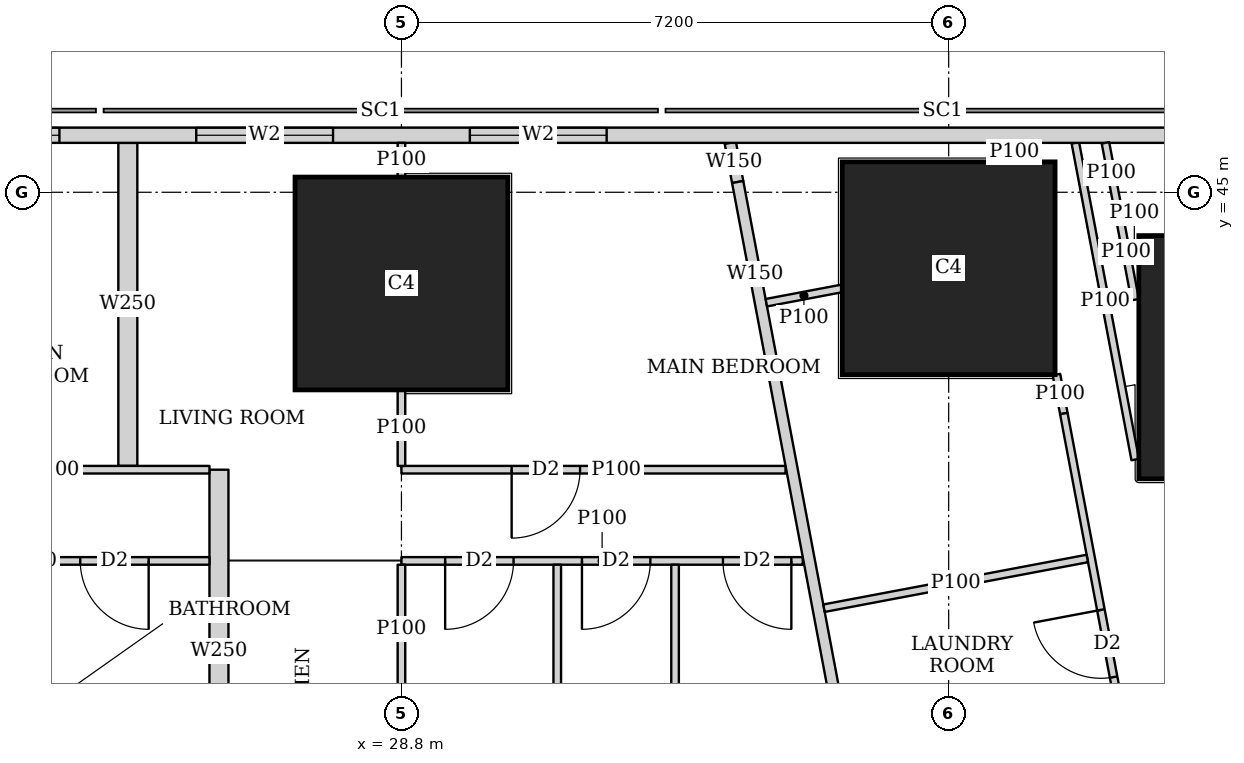
"""IFC4 building model, lengths in metres.
Left out: names, types, materials, properties, quantities, classifications, styles, units other than length and angle.
Written with IfcOpenShell. Run it as: python <this file> out.ifc"""

import sys

from ifc_helpers import new_model, si_unit, direction, frame, frame_2d, origin, origin_2d, place, context, subcontext, project, spatial, rectangle, extrude, element, fill, save


model = new_model("IFC4")
c1 = context("Model", 3, precision=1e-05, world=origin(), true_north=direction((0.0, 1.0)))
c2 = subcontext(c1, "Body", "Model", "MODEL_VIEW")
j1 = project(units=[si_unit("LENGTHUNIT", "METRE"), si_unit("PLANEANGLEUNIT", "RADIAN")], contexts=[c1])
p1 = place(None, origin())
s1 = spatial("IfcSite", under=j1, at=p1, CompositionType="ELEMENT")
p2 = place(p1, origin())
s2 = spatial("IfcBuilding", under=s1, at=p2, CompositionType="ELEMENT")
p3 = place(p2, frame((0.0, 0.0, 65.0)))
s3 = spatial("IfcBuildingStorey", under=s2, at=p3, CompositionType="ELEMENT", Elevation=65.0)
p4 = place(p3, frame((40.102, 42.83, 0.0), z_axis=(0.0, 0.0, 1.0), x_axis=(1.0, 0.0, 0.0)))
e1 = element("IfcColumn", 1, at=p4, inside=s3, PredefinedType="COLUMN", context=c2, shape_type="SweptSolid", body=[
    extrude(rectangle(XDim=3.2, YDim=3.2, at=origin_2d()), origin(), (0.0, 0.0, 1.0), 3.75),
])
for number, where, z_axis, x_axis in (
    (2, (28.8, 43.8, 0.0), (0.0, 0.0, 1.0), (1.0, 0.0, 0.0)),
    (3, (36.0, 44.0, 0.0), (0.0, 0.0, 1.0), (1.0, 0.0, 0.0)),
):
    element("IfcColumn", number, at=place(p3, frame(where, z_axis=z_axis, x_axis=x_axis)), inside=s3, PredefinedType="COLUMN", context=c2, shape_type="SweptSolid", body=[
        extrude(rectangle(XDim=2.8, YDim=2.8, at=origin_2d()), origin(), (0.0, 0.0, 1.0), 3.75),
    ])
p5 = place(p3, frame((40.106, 45.75, 0.0), z_axis=(0.0, 0.0, 1.0), x_axis=(-1.0, 0.0, 0.0)))
e4 = element("IfcWall", 4, at=p5, inside=s3, PredefinedType="SOLIDWALL", context=c2, shape_type="SweptSolid", body=[
    extrude(rectangle(XDim=37.943, YDim=0.2, at=frame_2d((18.971, 0.0))), origin(), (0.0, 0.0, 1.0), 3.5),
])
p6 = place(p5, frame((8.606, 0.0, 0.9)))
e5 = element("IfcOpeningElement", 5, at=p6, cuts=e4, PredefinedType="OPENING", context=c2, shape_type="SweptSolid", body=[
    extrude(rectangle(XDim=1.8, YDim=1.5, at=frame_2d((0.9, 0.75))), frame((0.0, 0.11, 0.0), z_axis=(0.0, -1.0, 0.0), x_axis=(1.0, 0.0, 0.0)), (0.0, 0.0, 1.0), 0.22),
])
p7 = place(p5, frame((12.206, 0.0, 0.9)))
e6 = element("IfcOpeningElement", 6, at=p7, cuts=e4, PredefinedType="OPENING", context=c2, shape_type="SweptSolid", body=[
    extrude(rectangle(XDim=1.8, YDim=1.5, at=frame_2d((0.9, 0.75))), frame((0.0, 0.11, 0.0), z_axis=(0.0, -1.0, 0.0), x_axis=(1.0, 0.0, 0.0)), (0.0, 0.0, 1.0), 0.22),
])
p8 = place(p5, frame((15.806, 0.0, 0.9)))
e7 = element("IfcOpeningElement", 7, at=p8, cuts=e4, PredefinedType="OPENING", context=c2, shape_type="SweptSolid", body=[
    extrude(rectangle(XDim=1.8, YDim=1.5, at=frame_2d((0.9, 0.75))), frame((0.0, 0.11, 0.0), z_axis=(0.0, -1.0, 0.0), x_axis=(1.0, 0.0, 0.0)), (0.0, 0.0, 1.0), 0.22),
])
p9 = place(p5, frame((19.406, 0.0, 0.9)))
e8 = element("IfcOpeningElement", 8, at=p9, cuts=e4, PredefinedType="OPENING", context=c2, shape_type="SweptSolid", body=[
    extrude(rectangle(XDim=1.8, YDim=1.5, at=frame_2d((0.9, 0.75))), frame((0.0, 0.11, 0.0), z_axis=(0.0, -1.0, 0.0), x_axis=(1.0, 0.0, 0.0)), (0.0, 0.0, 1.0), 0.22),
])
p10 = place(p5, frame((23.006, 0.0, 0.9)))
e9 = element("IfcOpeningElement", 9, at=p10, cuts=e4, PredefinedType="OPENING", context=c2, shape_type="SweptSolid", body=[
    extrude(rectangle(XDim=1.8, YDim=1.5, at=frame_2d((0.9, 0.75))), frame((0.0, 0.11, 0.0), z_axis=(0.0, -1.0, 0.0), x_axis=(1.0, 0.0, 0.0)), (0.0, 0.0, 1.0), 0.22),
])
p11 = place(p5, frame((26.606, 0.0, 0.9)))
e10 = element("IfcOpeningElement", 10, at=p11, cuts=e4, PredefinedType="OPENING", context=c2, shape_type="SweptSolid", body=[
    extrude(rectangle(XDim=1.8, YDim=1.5, at=frame_2d((0.9, 0.75))), frame((0.0, 0.11, 0.0), z_axis=(0.0, -1.0, 0.0), x_axis=(1.0, 0.0, 0.0)), (0.0, 0.0, 1.0), 0.22),
])
p12 = place(p3, frame((33.127, 45.65, 0.0), z_axis=(0.0, 0.0, 1.0), x_axis=(0.185441815104, -0.982655246366, 0.0)))
e11 = element("IfcWall", 11, at=p12, inside=s3, PredefinedType="SOLIDWALL", context=c2, shape_type="SweptSolid", body=[
    extrude(rectangle(XDim=0.524, YDim=0.15, at=frame_2d((0.262, 0.0))), origin(), (0.0, 0.0, 1.0), 3.5),
])
p13 = place(p3, frame((33.224, 45.135, 0.0), z_axis=(0.0, 0.0, 1.0), x_axis=(0.185681462868, -0.982609990967, 0.0)))
e12 = element("IfcWall", 12, at=p13, inside=s3, PredefinedType="SOLIDWALL", context=c2, shape_type="SweptSolid", body=[
    extrude(rectangle(XDim=2.455, YDim=0.15, at=frame_2d((1.228, 0.0))), origin(), (0.0, 0.0, 1.0), 2.05),
])
p14 = place(p3, frame((33.68, 42.723, 0.0), z_axis=(0.0, 0.0, 1.0), x_axis=(0.185624129307, -0.98262082342, 0.0)))
e13 = element("IfcWall", 13, at=p14, inside=s3, PredefinedType="SOLIDWALL", context=c2, shape_type="SweptSolid", body=[
    extrude(rectangle(XDim=41.051, YDim=0.15, at=frame_2d((20.526, 0.0))), origin(), (0.0, 0.0, 1.0), 2.5),
])
p15 = place(p14, frame((13.577, 0.0, 0.0)))
e14 = element("IfcOpeningElement", 14, at=p15, cuts=e13, PredefinedType="OPENING", context=c2, shape_type="SweptSolid", body=[
    extrude(rectangle(XDim=1.0, YDim=2.1, at=frame_2d((0.5, 1.05))), frame((0.0, 0.085, 0.0), z_axis=(0.0, -1.0, 0.0), x_axis=(1.0, 0.0, 0.0)), (0.0, 0.0, 1.0), 0.17),
])
p16 = place(p14, frame((17.394, 0.0, 0.0)))
e15 = element("IfcOpeningElement", 15, at=p16, cuts=e13, PredefinedType="OPENING", context=c2, shape_type="SweptSolid", body=[
    extrude(rectangle(XDim=1.0, YDim=2.1, at=frame_2d((0.5, 1.05))), frame((0.0, 0.085, 0.0), z_axis=(0.0, -1.0, 0.0), x_axis=(1.0, 0.0, 0.0)), (0.0, 0.0, 1.0), 0.17),
])
p17 = place(p14, frame((26.758, 0.0, 0.0)))
e16 = element("IfcOpeningElement", 16, at=p17, cuts=e13, PredefinedType="OPENING", context=c2, shape_type="SweptSolid", body=[
    extrude(rectangle(XDim=1.0, YDim=2.1, at=frame_2d((0.5, 1.05))), frame((0.0, 0.085, 0.0), z_axis=(0.0, -1.0, 0.0), x_axis=(1.0, 0.0, 0.0)), (0.0, 0.0, 1.0), 0.17),
])
p18 = place(p14, frame((32.193, 0.0, 0.0)))
e17 = element("IfcOpeningElement", 17, at=p18, cuts=e13, PredefinedType="OPENING", context=c2, shape_type="SweptSolid", body=[
    extrude(rectangle(XDim=1.0, YDim=2.1, at=frame_2d((0.5, 1.05))), frame((0.0, 0.085, 0.0), z_axis=(0.0, -1.0, 0.0), x_axis=(1.0, 0.0, 0.0)), (0.0, 0.0, 1.0), 0.17),
])
p19 = place(p3, frame((38.454, 41.483, 0.0), z_axis=(0.0, 0.0, 1.0), x_axis=(-0.185609245326, 0.982623634994, 0.0)))
e18 = element("IfcWall", 18, at=p19, inside=s3, PredefinedType="PARTITIONING", context=c2, shape_type="SweptSolid", body=[
    extrude(rectangle(XDim=4.241, YDim=0.1, at=frame_2d((2.12, 0.0))), origin(), (0.0, 0.0, 1.0), 2.05),
])
p20 = place(p3, frame((38.063, 45.65, 0.0), z_axis=(0.0, 0.0, 1.0), x_axis=(0.186109918919, -0.982528929895, 0.0)))
e19 = element("IfcWall", 19, at=p20, inside=s3, PredefinedType="PARTITIONING", context=c2, shape_type="SweptSolid", body=[
    extrude(rectangle(XDim=0.817, YDim=0.1, at=frame_2d((0.409, 0.0))), origin(), (0.0, 0.0, 1.0), 3.5),
])
p21 = place(p3, frame((38.215, 44.847, 0.0), z_axis=(0.0, 0.0, 1.0), x_axis=(0.185449486507, -0.982653798626, 0.0)))
e20 = element("IfcWall", 20, at=p21, inside=s3, PredefinedType="PARTITIONING", context=c2, shape_type="SweptSolid", body=[
    extrude(rectangle(XDim=1.282, YDim=0.1, at=frame_2d((0.641, 0.0))), origin(), (0.0, 0.0, 1.0), 2.05),
])
p22 = place(p3, frame((36.842, 45.65, 0.0), z_axis=(0.0, 0.0, 1.0), x_axis=(0.183986661451, -0.982928740249, 0.0)))
e21 = element("IfcWall", 21, at=p22, inside=s3, PredefinedType="PARTITIONING", context=c2, shape_type="SweptSolid", body=[
    extrude(rectangle(XDim=0.244, YDim=0.1, at=frame_2d((0.122, 0.0))), origin(), (0.0, 0.0, 1.0), 3.5),
])
p23 = place(p3, frame((37.418, 42.602, 0.0), z_axis=(0.0, 0.0, 1.0), x_axis=(0.185672001976, -0.982611778721, 0.0)))
e22 = element("IfcWall", 22, at=p23, inside=s3, PredefinedType="PARTITIONING", context=c2, shape_type="SweptSolid", body=[
    extrude(rectangle(XDim=0.522, YDim=0.1, at=frame_2d((0.261, 0.0))), origin(), (0.0, 0.0, 1.0), 2.05),
])
p24 = place(p3, frame((37.515, 42.089, 0.0), z_axis=(0.0, 0.0, 1.0), x_axis=(0.185565000991, -0.982631991341, 0.0)))
e23 = element("IfcWall", 23, at=p24, inside=s3, PredefinedType="PARTITIONING", context=c2, shape_type="SweptSolid", body=[
    extrude(rectangle(XDim=10.784, YDim=0.1, at=frame_2d((5.392, 0.0))), origin(), (0.0, 0.0, 1.0), 3.5),
])
p25 = place(p24, frame((9.358, 0.0, 0.0)))
e24 = element("IfcOpeningElement", 24, at=p25, cuts=e23, PredefinedType="OPENING", context=c2, shape_type="SweptSolid", body=[
    extrude(rectangle(XDim=0.9, YDim=2.1, at=frame_2d((0.45, 1.05))), frame((0.0, 0.06, 0.0), z_axis=(0.0, -1.0, 0.0), x_axis=(1.0, 0.0, 0.0)), (0.0, 0.0, 1.0), 0.12),
])
p26 = place(p24, frame((5.173, 0.0, 0.0)))
e25 = element("IfcOpeningElement", 25, at=p26, cuts=e23, PredefinedType="OPENING", context=c2, shape_type="SweptSolid", body=[
    extrude(rectangle(XDim=0.9, YDim=2.1, at=frame_2d((0.45, 1.05))), frame((0.0, 0.06, 0.0), z_axis=(0.0, -1.0, 0.0), x_axis=(1.0, 0.0, 0.0)), (0.0, 0.0, 1.0), 0.12),
])
p27 = place(p24, frame((2.629, 0.0, 0.0)))
e26 = element("IfcOpeningElement", 26, at=p27, cuts=e23, PredefinedType="OPENING", context=c2, shape_type="SweptSolid", body=[
    extrude(rectangle(XDim=0.9, YDim=2.1, at=frame_2d((0.45, 1.05))), frame((0.0, 0.06, 0.0), z_axis=(0.0, -1.0, 0.0), x_axis=(1.0, 0.0, 0.0)), (0.0, 0.0, 1.0), 0.12),
])
p28 = place(p24, frame((7.451, 0.0, 0.0)))
e27 = element("IfcOpeningElement", 27, at=p28, cuts=e23, PredefinedType="OPENING", context=c2, shape_type="SweptSolid", body=[
    extrude(rectangle(XDim=0.9, YDim=2.1, at=frame_2d((0.45, 1.05))), frame((0.0, 0.06, 0.0), z_axis=(0.0, -1.0, 0.0), x_axis=(1.0, 0.0, 0.0)), (0.0, 0.0, 1.0), 0.12),
])
p29 = place(p3, frame((38.492, 44.193, 0.0), z_axis=(0.0, 0.0, 1.0), x_axis=(-0.981954528773, -0.189117168504, 0.0)))
e28 = element("IfcWall", 28, at=p29, inside=s3, PredefinedType="PARTITIONING", context=c2, shape_type="SweptSolid", body=[
    extrude(rectangle(XDim=0.101, YDim=0.1, at=frame_2d((0.05, 0.0))), origin(), (0.0, 0.0, 1.0), 2.05),
])
p30 = place(p3, frame((34.59, 43.734, 0.0), z_axis=(0.0, 0.0, 1.0), x_axis=(-0.982632457012, -0.185562535081, 0.0)))
e29 = element("IfcWall", 29, at=p30, inside=s3, PredefinedType="PARTITIONING", context=c2, shape_type="SweptSolid", body=[
    extrude(rectangle(XDim=1.007, YDim=0.1, at=frame_2d((0.503, 0.0))), origin(), (0.0, 0.0, 1.0), 2.05),
])
p31 = place(p3, frame((37.824, 40.182, 0.0), z_axis=(0.0, 0.0, 1.0), x_axis=(-0.982648794755, -0.185475998897, 0.0)))
e30 = element("IfcWall", 30, at=p31, inside=s3, PredefinedType="PARTITIONING", context=c2, shape_type="SweptSolid", body=[
    extrude(rectangle(XDim=3.525, YDim=0.1, at=frame_2d((1.763, 0.0))), origin(), (0.0, 0.0, 1.0), 3.5),
])
p32 = place(p3, frame((21.6, 41.35, 0.0), z_axis=(0.0, 0.0, 1.0), x_axis=(1.0, 0.0, 0.0)))
e31 = element("IfcWall", 31, at=p32, inside=s3, PredefinedType="PARTITIONING", context=c2, shape_type="SweptSolid", body=[
    extrude(rectangle(XDim=4.674, YDim=0.1, at=frame_2d((2.337, 0.0))), origin(), (0.0, 0.0, 1.0), 3.5),
])
p33 = place(p32, frame((1.45, 0.0, 0.0)))
e32 = element("IfcOpeningElement", 32, at=p33, cuts=e31, PredefinedType="OPENING", context=c2, shape_type="SweptSolid", body=[
    extrude(rectangle(XDim=0.9, YDim=2.1, at=frame_2d((0.45, 1.05))), frame((0.0, 0.06, 0.0), z_axis=(0.0, -1.0, 0.0), x_axis=(1.0, 0.0, 0.0)), (0.0, 0.0, 1.0), 0.12),
])
p34 = place(p3, frame((21.6, 40.15, 0.0), z_axis=(0.0, 0.0, 1.0), x_axis=(1.0, 0.0, 0.0)))
e33 = element("IfcWall", 33, at=p34, inside=s3, PredefinedType="PARTITIONING", context=c2, shape_type="SweptSolid", body=[
    extrude(rectangle(XDim=4.674, YDim=0.1, at=frame_2d((2.337, 0.0))), origin(), (0.0, 0.0, 1.0), 3.5),
])
p35 = place(p34, frame((0.575, 0.0, 0.0)))
e34 = element("IfcOpeningElement", 34, at=p35, cuts=e33, PredefinedType="OPENING", context=c2, shape_type="SweptSolid", body=[
    extrude(rectangle(XDim=0.9, YDim=2.1, at=frame_2d((0.45, 1.05))), frame((0.0, 0.06, 0.0), z_axis=(0.0, -1.0, 0.0), x_axis=(1.0, 0.0, 0.0)), (0.0, 0.0, 1.0), 0.12),
])
p36 = place(p34, frame((2.974, 0.0, 0.0)))
e35 = element("IfcOpeningElement", 35, at=p36, cuts=e33, PredefinedType="OPENING", context=c2, shape_type="SweptSolid", body=[
    extrude(rectangle(XDim=0.9, YDim=2.1, at=frame_2d((0.45, 1.05))), frame((0.0, 0.06, 0.0), z_axis=(0.0, -1.0, 0.0), x_axis=(1.0, 0.0, 0.0)), (0.0, 0.0, 1.0), 0.12),
])
p37 = place(p3, frame((28.8, 41.35, 0.0), z_axis=(0.0, 0.0, 1.0), x_axis=(1.0, 0.0, 0.0)))
e36 = element("IfcWall", 36, at=p37, inside=s3, PredefinedType="PARTITIONING", context=c2, shape_type="SweptSolid", body=[
    extrude(rectangle(XDim=5.053, YDim=0.1, at=frame_2d((2.526, 0.0))), origin(), (0.0, 0.0, 1.0), 3.5),
])
p38 = place(p37, frame((1.45, 0.0, 0.0)))
e37 = element("IfcOpeningElement", 37, at=p38, cuts=e36, PredefinedType="OPENING", context=c2, shape_type="SweptSolid", body=[
    extrude(rectangle(XDim=0.9, YDim=2.1, at=frame_2d((0.45, 1.05))), frame((0.0, 0.06, 0.0), z_axis=(0.0, -1.0, 0.0), x_axis=(1.0, 0.0, 0.0)), (0.0, 0.0, 1.0), 0.12),
])
p39 = place(p3, frame((28.8, 40.15, 0.0), z_axis=(0.0, 0.0, 1.0), x_axis=(1.0, 0.0, 0.0)))
e38 = element("IfcWall", 38, at=p39, inside=s3, PredefinedType="PARTITIONING", context=c2, shape_type="SweptSolid", body=[
    extrude(rectangle(XDim=5.28, YDim=0.1, at=frame_2d((2.64, 0.0))), origin(), (0.0, 0.0, 1.0), 3.5),
])
p40 = place(p39, frame((0.575, 0.0, 0.0)))
e39 = element("IfcOpeningElement", 39, at=p40, cuts=e38, PredefinedType="OPENING", context=c2, shape_type="SweptSolid", body=[
    extrude(rectangle(XDim=0.9, YDim=2.1, at=frame_2d((0.45, 1.05))), frame((0.0, 0.06, 0.0), z_axis=(0.0, -1.0, 0.0), x_axis=(1.0, 0.0, 0.0)), (0.0, 0.0, 1.0), 0.12),
])
p41 = place(p39, frame((4.23, 0.0, 0.0)))
e40 = element("IfcOpeningElement", 40, at=p41, cuts=e38, PredefinedType="OPENING", context=c2, shape_type="SweptSolid", body=[
    extrude(rectangle(XDim=0.9, YDim=2.1, at=frame_2d((0.45, 1.05))), frame((0.0, 0.06, 0.0), z_axis=(0.0, -1.0, 0.0), x_axis=(1.0, 0.0, 0.0)), (0.0, 0.0, 1.0), 0.12),
])
p42 = place(p39, frame((2.375, 0.0, 0.0)))
e41 = element("IfcOpeningElement", 41, at=p42, cuts=e38, PredefinedType="OPENING", context=c2, shape_type="SweptSolid", body=[
    extrude(rectangle(XDim=0.9, YDim=2.1, at=frame_2d((0.45, 1.05))), frame((0.0, 0.06, 0.0), z_axis=(0.0, -1.0, 0.0), x_axis=(1.0, 0.0, 0.0)), (0.0, 0.0, 1.0), 0.12),
])
p43 = place(p3, frame((28.8, 41.4, 0.0), z_axis=(0.0, 0.0, 1.0), x_axis=(0.0, 1.0, 0.0)))
e42 = element("IfcWall", 42, at=p43, inside=s3, PredefinedType="PARTITIONING", context=c2, shape_type="SweptSolid", body=[
    extrude(rectangle(XDim=0.999, YDim=0.1, at=frame_2d((0.5, 0.0))), origin(), (0.0, 0.0, 1.0), 3.5),
])
p44 = place(p3, frame((28.8, 45.201, 0.0), z_axis=(0.0, 0.0, 1.0), x_axis=(0.0, 1.0, 0.0)))
e43 = element("IfcWall", 43, at=p44, inside=s3, PredefinedType="PARTITIONING", context=c2, shape_type="SweptSolid", body=[
    extrude(rectangle(XDim=0.449, YDim=0.1, at=frame_2d((0.225, 0.0))), origin(), (0.0, 0.0, 1.0), 3.5),
])
p45 = place(p3, frame((28.8, 38.401, 0.0), z_axis=(0.0, 0.0, 1.0), x_axis=(0.0, 1.0, 0.0)))
e44 = element("IfcWall", 44, at=p45, inside=s3, PredefinedType="PARTITIONING", context=c2, shape_type="SweptSolid", body=[
    extrude(rectangle(XDim=1.699, YDim=0.1, at=frame_2d((0.85, 0.0))), origin(), (0.0, 0.0, 1.0), 3.5),
])
for number, where, z_axis, x_axis in (
    (45, (32.4, 36.575, 0.0), (0.0, 0.0, 1.0), (0.0, 1.0, 0.0)),
    (46, (30.85, 36.575, 0.0), (0.0, 0.0, 1.0), (0.0, 1.0, 0.0)),
):
    element("IfcWall", number, at=place(p3, frame(where, z_axis=z_axis, x_axis=x_axis)), inside=s3, PredefinedType="PARTITIONING", context=c2, shape_type="SweptSolid", body=[
        extrude(rectangle(XDim=3.525, YDim=0.1, at=frame_2d((1.763, 0.0))), origin(), (0.0, 0.0, 1.0), 3.5),
    ])
p46 = place(p3, frame((25.2, 41.4, 0.0), z_axis=(0.0, 0.0, 1.0), x_axis=(0.0, 1.0, 0.0)))
e47 = element("IfcWall", 47, at=p46, inside=s3, PredefinedType="SOLIDWALL", context=c2, shape_type="SweptSolid", body=[
    extrude(rectangle(XDim=4.25, YDim=0.25, at=frame_2d((2.125, 0.0))), origin(), (0.0, 0.0, 1.0), 2.05),
])
p47 = place(p3, frame((26.399, 36.575, 0.0), z_axis=(0.0, 0.0, 1.0), x_axis=(0.0, 1.0, 0.0)))
e48 = element("IfcWall", 48, at=p47, inside=s3, PredefinedType="SOLIDWALL", context=c2, shape_type="SweptSolid", body=[
    extrude(rectangle(XDim=4.775, YDim=0.25, at=frame_2d((2.388, 0.0))), origin(), (0.0, 0.0, 1.0), 3.5),
])
p48 = place(p6, origin())
e49 = element("IfcWindow", 49, at=p48, inside=s3, PartitioningType="SINGLE_PANEL", PredefinedType="WINDOW", context=c2, shape_type="SweptSolid", body=[
    extrude(rectangle(XDim=1.8, YDim=1.5, at=frame_2d((0.9, 0.75))), frame((0.0, 0.03, 0.0), z_axis=(0.0, -1.0, 0.0), x_axis=(1.0, 0.0, 0.0)), (0.0, 0.0, 1.0), 0.06),
])
fill(e5, e49)
p49 = place(p7, origin())
e50 = element("IfcWindow", 50, at=p49, inside=s3, PartitioningType="SINGLE_PANEL", PredefinedType="WINDOW", context=c2, shape_type="SweptSolid", body=[
    extrude(rectangle(XDim=1.8, YDim=1.5, at=frame_2d((0.9, 0.75))), frame((0.0, 0.03, 0.0), z_axis=(0.0, -1.0, 0.0), x_axis=(1.0, 0.0, 0.0)), (0.0, 0.0, 1.0), 0.06),
])
fill(e6, e50)
p50 = place(p8, origin())
e51 = element("IfcWindow", 51, at=p50, inside=s3, PartitioningType="SINGLE_PANEL", PredefinedType="WINDOW", context=c2, shape_type="SweptSolid", body=[
    extrude(rectangle(XDim=1.8, YDim=1.5, at=frame_2d((0.9, 0.75))), frame((0.0, 0.03, 0.0), z_axis=(0.0, -1.0, 0.0), x_axis=(1.0, 0.0, 0.0)), (0.0, 0.0, 1.0), 0.06),
])
fill(e7, e51)
p51 = place(p27, origin())
e52 = element("IfcDoor", 52, at=p51, inside=s3, OperationType="SINGLE_SWING_RIGHT", PredefinedType="DOOR", context=c2, shape_type="SweptSolid", body=[
    extrude(rectangle(XDim=0.9, YDim=2.1, at=frame_2d((0.45, 1.05))), frame((0.0, 0.025, 0.0), z_axis=(0.0, -1.0, 0.0), x_axis=(1.0, 0.0, 0.0)), (0.0, 0.0, 1.0), 0.05),
])
fill(e26, e52)
p52 = place(p36, origin())
e53 = element("IfcDoor", 53, at=p52, inside=s3, OperationType="SINGLE_SWING_LEFT", PredefinedType="DOOR", context=c2, shape_type="SweptSolid", body=[
    extrude(rectangle(XDim=0.9, YDim=2.1, at=frame_2d((0.45, 1.05))), frame((0.0, 0.025, 0.0), z_axis=(0.0, -1.0, 0.0), x_axis=(1.0, 0.0, 0.0)), (0.0, 0.0, 1.0), 0.05),
])
fill(e35, e53)
p53 = place(p38, origin())
e54 = element("IfcDoor", 54, at=p53, inside=s3, OperationType="SINGLE_SWING_RIGHT", PredefinedType="DOOR", context=c2, shape_type="SweptSolid", body=[
    extrude(rectangle(XDim=0.9, YDim=2.1, at=frame_2d((0.45, 1.05))), frame((0.0, 0.025, 0.0), z_axis=(0.0, -1.0, 0.0), x_axis=(1.0, 0.0, 0.0)), (0.0, 0.0, 1.0), 0.05),
])
fill(e37, e54)
p54 = place(p40, origin())
e55 = element("IfcDoor", 55, at=p54, inside=s3, OperationType="SINGLE_SWING_RIGHT", PredefinedType="DOOR", context=c2, shape_type="SweptSolid", body=[
    extrude(rectangle(XDim=0.9, YDim=2.1, at=frame_2d((0.45, 1.05))), frame((0.0, 0.025, 0.0), z_axis=(0.0, -1.0, 0.0), x_axis=(1.0, 0.0, 0.0)), (0.0, 0.0, 1.0), 0.05),
])
fill(e39, e55)
p55 = place(p41, origin())
e56 = element("IfcDoor", 56, at=p55, inside=s3, OperationType="SINGLE_SWING_LEFT", PredefinedType="DOOR", context=c2, shape_type="SweptSolid", body=[
    extrude(rectangle(XDim=0.9, YDim=2.1, at=frame_2d((0.45, 1.05))), frame((0.0, 0.025, 0.0), z_axis=(0.0, -1.0, 0.0), x_axis=(1.0, 0.0, 0.0)), (0.0, 0.0, 1.0), 0.05),
])
fill(e40, e56)
p56 = place(p42, origin())
e57 = element("IfcDoor", 57, at=p56, inside=s3, OperationType="SINGLE_SWING_RIGHT", PredefinedType="DOOR", context=c2, shape_type="SweptSolid", body=[
    extrude(rectangle(XDim=0.9, YDim=2.1, at=frame_2d((0.45, 1.05))), frame((0.0, 0.025, 0.0), z_axis=(0.0, -1.0, 0.0), x_axis=(1.0, 0.0, 0.0)), (0.0, 0.0, 1.0), 0.05),
])
fill(e41, e57)
save(model, sys.argv[1])
